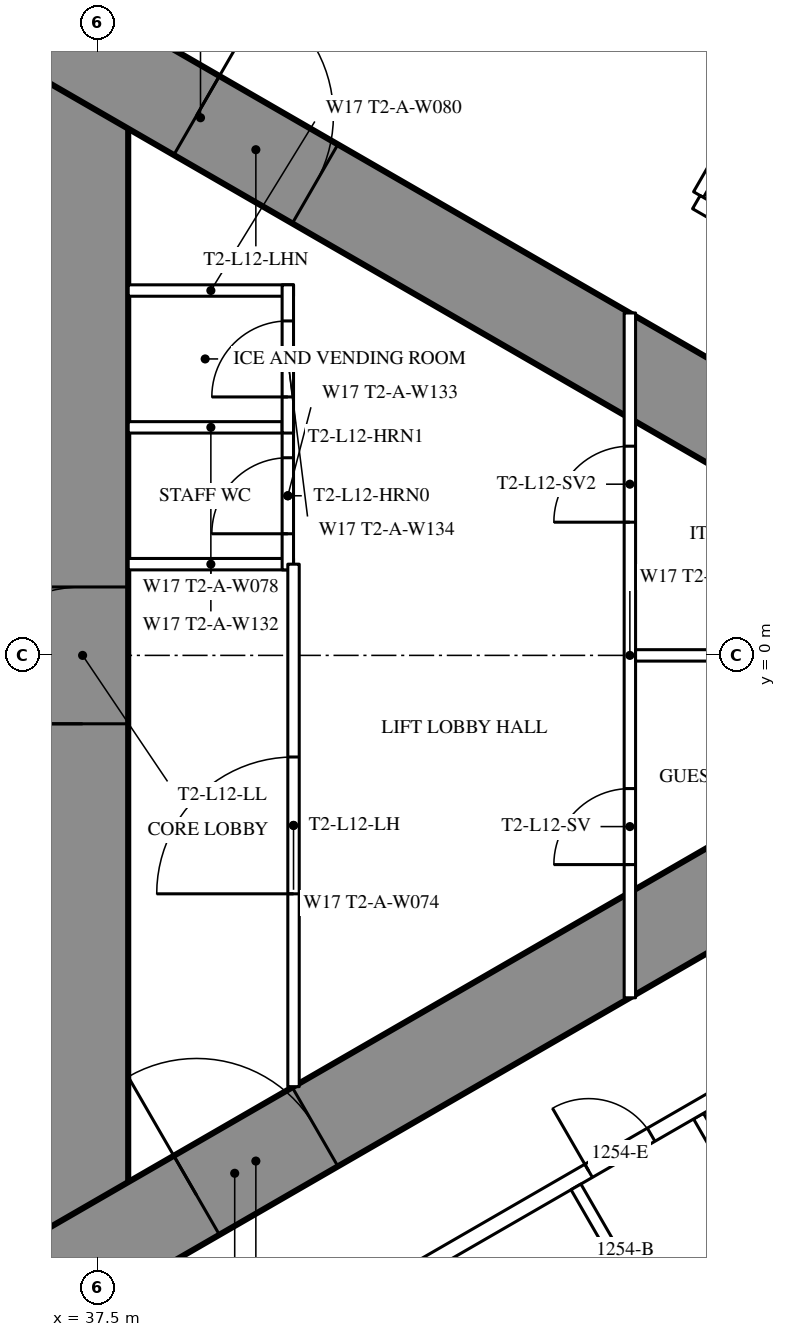
"""IFC4 building model, lengths in metres.
Left out: names, types, materials, properties, quantities, classifications, styles, units other than length and angle.
Written with IfcOpenShell. Run it as: python <this file> out.ifc"""

import sys

from ifc_helpers import new_model, si_unit, direction, frame, frame_2d, origin, place, context, subcontext, project, spatial, rectangle, extrude, element, fill, save


model = new_model("IFC4")
c1 = context("Model", 3, precision=1e-05, world=origin(), true_north=direction((0.0, 1.0)))
c2 = subcontext(c1, "Body", "Model", "MODEL_VIEW")
j1 = project(units=[si_unit("LENGTHUNIT", "METRE"), si_unit("PLANEANGLEUNIT", "RADIAN")], contexts=[c1])
p1 = place(None, origin())
s1 = spatial("IfcSite", under=j1, at=p1, CompositionType="ELEMENT")
p2 = place(p1, origin())
s2 = spatial("IfcBuilding", under=s1, at=p2, CompositionType="ELEMENT")
p3 = place(p2, frame((0.0, 0.0, 49.5)))
s3 = spatial("IfcBuildingStorey", under=s2, at=p3, CompositionType="ELEMENT", Elevation=49.5)
p4 = place(p3, frame((37.3, -8.6, 0.0), z_axis=(0.0, 0.0, 1.0), x_axis=(0.0, 1.0, 0.0)))
e1 = element("IfcWall", 1, at=p4, inside=s3, PredefinedType="SHEAR", context=c2, shape_type="SweptSolid", body=[
    extrude(rectangle(XDim=17.2, YDim=1.2, at=frame_2d((8.6, 0.0))), origin(), (0.0, 0.0, 1.0), 3.5),
])
p5 = place(p4, frame((7.7, 0.0, 0.0)))
e2 = element("IfcOpeningElement", 2, at=p5, cuts=e1, PredefinedType="OPENING", context=c2, shape_type="SweptSolid", body=[
    extrude(rectangle(XDim=1.8, YDim=2.2, at=frame_2d((0.9, 1.1))), frame((0.0, 0.61, 0.0), z_axis=(0.0, -1.0, 0.0), x_axis=(1.0, 0.0, 0.0)), (0.0, 0.0, 1.0), 1.22),
])
p6 = place(p3, frame((27.2, -13.8, 0.0), z_axis=(0.0, 0.0, 1.0), x_axis=(0.866027159892, 0.499996958321, 0.0)))
e3 = element("IfcWall", 3, at=p6, inside=s3, PredefinedType="SHEAR", context=c2, shape_type="SweptSolid", body=[
    extrude(rectangle(XDim=27.947, YDim=1.2, at=frame_2d((13.973, 0.0))), origin(), (0.0, 0.0, 1.0), 3.5),
])
p7 = place(p6, frame((4.6, 0.0, 0.0)))
e4 = element("IfcOpeningElement", 4, at=p7, cuts=e3, PredefinedType="OPENING", context=c2, shape_type="SweptSolid", body=[
    extrude(rectangle(XDim=1.0, YDim=2.2, at=frame_2d((0.5, 1.1))), frame((0.0, 0.61, 0.0), z_axis=(0.0, -1.0, 0.0), x_axis=(1.0, 0.0, 0.0)), (0.0, 0.0, 1.0), 1.22),
])
p8 = place(p6, frame((13.395, 0.0, 0.0)))
e5 = element("IfcOpeningElement", 5, at=p8, cuts=e3, PredefinedType="OPENING", context=c2, shape_type="SweptSolid", body=[
    extrude(rectangle(XDim=1.8, YDim=2.2, at=frame_2d((0.9, 1.1))), frame((0.0, 0.61, 0.0), z_axis=(0.0, -1.0, 0.0), x_axis=(1.0, 0.0, 0.0)), (0.0, 0.0, 1.0), 1.22),
])
p9 = place(p3, frame((27.2, 13.8, 0.0), z_axis=(0.0, 0.0, 1.0), x_axis=(0.866024515034, -0.500001539357, 0.0)))
e6 = element("IfcWall", 6, at=p9, inside=s3, PredefinedType="SHEAR", context=c2, shape_type="SweptSolid", body=[
    extrude(rectangle(XDim=26.907, YDim=1.2, at=frame_2d((13.454, 0.0))), origin(), (0.0, 0.0, 1.0), 3.5),
])
p10 = place(p9, frame((4.6, 0.0, 0.0)))
e7 = element("IfcOpeningElement", 7, at=p10, cuts=e6, PredefinedType="OPENING", context=c2, shape_type="SweptSolid", body=[
    extrude(rectangle(XDim=1.0, YDim=2.2, at=frame_2d((0.5, 1.1))), frame((0.0, 0.61, 0.0), z_axis=(0.0, -1.0, 0.0), x_axis=(1.0, 0.0, 0.0)), (0.0, 0.0, 1.0), 1.22),
])
p11 = place(p9, frame((13.395, 0.0, 0.0)))
e8 = element("IfcOpeningElement", 8, at=p11, cuts=e6, PredefinedType="OPENING", context=c2, shape_type="SweptSolid", body=[
    extrude(rectangle(XDim=1.8, YDim=2.2, at=frame_2d((0.9, 1.1))), frame((0.0, 0.61, 0.0), z_axis=(0.0, -1.0, 0.0), x_axis=(1.0, 0.0, 0.0)), (0.0, 0.0, 1.0), 1.22),
])
p12 = place(p3, frame((45.403, -6.062, 0.0), z_axis=(0.0, 0.0, 1.0), x_axis=(0.500007077968, -0.866021317279, 0.0)))
e9 = element("IfcWall", 9, at=p12, inside=s3, PredefinedType="PARTITIONING", context=c2, shape_type="SweptSolid", body=[
    extrude(rectangle(XDim=12.721, YDim=0.15, at=frame_2d((6.361, 0.0))), origin(), (0.0, 0.0, 1.0), 3.25),
])
p13 = place(p3, frame((45.403, 6.062, 0.0), z_axis=(0.0, 0.0, 1.0), x_axis=(0.500013434677, 0.866017647131, 0.0)))
e10 = element("IfcWall", 10, at=p13, inside=s3, PredefinedType="PARTITIONING", context=c2, shape_type="SweptSolid", body=[
    extrude(rectangle(XDim=9.902, YDim=0.15, at=frame_2d((4.951, 0.0))), origin(), (0.0, 0.0, 1.0), 2.25),
])
p14 = place(p3, frame((37.96, -10.243, 0.0), z_axis=(0.0, 0.0, 1.0), x_axis=(0.866026429433, 0.499998223521, 0.0)))
e11 = element("IfcWall", 11, at=p14, inside=s3, PredefinedType="PARTITIONING", context=c2, shape_type="SweptSolid", body=[
    extrude(rectangle(XDim=20.487, YDim=0.2, at=frame_2d((10.243, 0.0))), origin(), (0.0, 0.0, 1.0), 3.25),
])
p15 = place(p14, frame((6.925, 0.0, 0.0)))
e12 = element("IfcOpeningElement", 12, at=p15, cuts=e11, PredefinedType="OPENING", context=c2, shape_type="SweptSolid", body=[
    extrude(rectangle(XDim=0.95, YDim=2.2, at=frame_2d((0.475, 1.1))), frame((0.0, 0.11, 0.0), z_axis=(0.0, -1.0, 0.0), x_axis=(1.0, 0.0, 0.0)), (0.0, 0.0, 1.0), 0.22),
])
p16 = place(p14, frame((11.549, 0.0, 0.0)))
e13 = element("IfcOpeningElement", 13, at=p16, cuts=e11, PredefinedType="OPENING", context=c2, shape_type="SweptSolid", body=[
    extrude(rectangle(XDim=0.95, YDim=2.2, at=frame_2d((0.475, 1.1))), frame((0.0, 0.11, 0.0), z_axis=(0.0, -1.0, 0.0), x_axis=(1.0, 0.0, 0.0)), (0.0, 0.0, 1.0), 0.22),
])
p17 = place(p14, frame((13.249, 0.0, 0.0)))
e14 = element("IfcOpeningElement", 14, at=p17, cuts=e11, PredefinedType="OPENING", context=c2, shape_type="SweptSolid", body=[
    extrude(rectangle(XDim=0.95, YDim=2.2, at=frame_2d((0.475, 1.1))), frame((0.0, 0.11, 0.0), z_axis=(0.0, -1.0, 0.0), x_axis=(1.0, 0.0, 0.0)), (0.0, 0.0, 1.0), 0.22),
])
p18 = place(p14, frame((17.585, 0.0, 0.0)))
e15 = element("IfcOpeningElement", 15, at=p18, cuts=e11, PredefinedType="OPENING", context=c2, shape_type="SweptSolid", body=[
    extrude(rectangle(XDim=0.95, YDim=2.2, at=frame_2d((0.475, 1.1))), frame((0.0, 0.11, 0.0), z_axis=(0.0, -1.0, 0.0), x_axis=(1.0, 0.0, 0.0)), (0.0, 0.0, 1.0), 0.22),
])
p19 = place(p14, frame((0.6, 0.0, 0.0)))
e16 = element("IfcOpeningElement", 16, at=p19, cuts=e11, PredefinedType="OPENING", context=c2, shape_type="SweptSolid", body=[
    extrude(rectangle(XDim=0.95, YDim=2.2, at=frame_2d((0.475, 1.1))), frame((0.0, 0.11, 0.0), z_axis=(0.0, -1.0, 0.0), x_axis=(1.0, 0.0, 0.0)), (0.0, 0.0, 1.0), 0.22),
])
p20 = place(p3, frame((45.375, 5.963, 0.0), z_axis=(0.0, 0.0, 1.0), x_axis=(0.86603164725, -0.499989185844, 0.0)))
e17 = element("IfcWall", 17, at=p20, inside=s3, PredefinedType="PARTITIONING", context=c2, shape_type="SweptSolid", body=[
    extrude(rectangle(XDim=11.805, YDim=0.2, at=frame_2d((5.903, 0.0))), origin(), (0.0, 0.0, 1.0), 3.25),
])
p21 = place(p20, frame((9.024, 0.0, 0.0)))
e18 = element("IfcOpeningElement", 18, at=p21, cuts=e17, PredefinedType="OPENING", context=c2, shape_type="SweptSolid", body=[
    extrude(rectangle(XDim=0.95, YDim=2.2, at=frame_2d((0.475, 1.1))), frame((0.0, 0.11, 0.0), z_axis=(0.0, -1.0, 0.0), x_axis=(1.0, 0.0, 0.0)), (0.0, 0.0, 1.0), 0.22),
])
p22 = place(p20, frame((7.324, 0.0, 0.0)))
e19 = element("IfcOpeningElement", 19, at=p22, cuts=e17, PredefinedType="OPENING", context=c2, shape_type="SweptSolid", body=[
    extrude(rectangle(XDim=0.95, YDim=2.2, at=frame_2d((0.475, 1.1))), frame((0.0, 0.11, 0.0), z_axis=(0.0, -1.0, 0.0), x_axis=(1.0, 0.0, 0.0)), (0.0, 0.0, 1.0), 0.22),
])
p23 = place(p3, frame((43.791, -6.993, 0.0), z_axis=(0.0, 0.0, 1.0), x_axis=(0.500047596559, -0.865997922154, 0.0)))
e20 = element("IfcWall", 20, at=p23, inside=s3, PredefinedType="PARTITIONING", context=c2, shape_type="SweptSolid", body=[
    extrude(rectangle(XDim=2.6, YDim=0.15, at=frame_2d((1.3, 0.0))), origin(), (0.0, 0.0, 1.0), 3.25),
])
p24 = place(p23, frame((0.9, 0.0, 0.0)))
e21 = element("IfcOpeningElement", 21, at=p24, cuts=e20, PredefinedType="OPENING", context=c2, shape_type="SweptSolid", body=[
    extrude(rectangle(XDim=0.8, YDim=2.2, at=frame_2d((0.4, 1.1))), frame((0.0, 0.085, 0.0), z_axis=(0.0, -1.0, 0.0), x_axis=(1.0, 0.0, 0.0)), (0.0, 0.0, 1.0), 0.17),
])
for number, where, z_axis, x_axis in (
    (22, (37.9, 1.2, 0.0), (0.0, 0.0, 1.0), (1.0, 0.0, 0.0)),
    (23, (37.9, 3.0, 0.0), (0.0, 0.0, 1.0), (1.0, 0.0, 0.0)),
    (24, (37.9, 4.8, 0.0), (0.0, 0.0, 1.0), (1.0, 0.0, 0.0)),
):
    element("IfcWall", number, at=place(p3, frame(where, z_axis=z_axis, x_axis=x_axis)), inside=s3, PredefinedType="PARTITIONING", context=c2, shape_type="SweptSolid", body=[
        extrude(rectangle(XDim=2.175, YDim=0.15, at=frame_2d((1.087, 0.0))), origin(), (0.0, 0.0, 1.0), 3.25),
    ])
p25 = place(p3, frame((40.0, 1.125, 0.0), z_axis=(0.0, 0.0, 1.0), x_axis=(0.0, 1.0, 0.0)))
e25 = element("IfcWall", 25, at=p25, inside=s3, PredefinedType="PARTITIONING", context=c2, shape_type="SweptSolid", body=[
    extrude(rectangle(XDim=1.95, YDim=0.15, at=frame_2d((0.975, 0.0))), origin(), (0.0, 0.0, 1.0), 3.25),
])
p26 = place(p25, frame((0.475, 0.0, 0.0)))
e26 = element("IfcOpeningElement", 26, at=p26, cuts=e25, PredefinedType="OPENING", context=c2, shape_type="SweptSolid", body=[
    extrude(rectangle(XDim=1.0, YDim=2.2, at=frame_2d((0.5, 1.1))), frame((0.0, 0.085, 0.0), z_axis=(0.0, -1.0, 0.0), x_axis=(1.0, 0.0, 0.0)), (0.0, 0.0, 1.0), 0.17),
])
p27 = place(p3, frame((40.0, 2.925, 0.0), z_axis=(0.0, 0.0, 1.0), x_axis=(0.0, 1.0, 0.0)))
e27 = element("IfcWall", 27, at=p27, inside=s3, PredefinedType="PARTITIONING", context=c2, shape_type="SweptSolid", body=[
    extrude(rectangle(XDim=1.95, YDim=0.15, at=frame_2d((0.975, 0.0))), origin(), (0.0, 0.0, 1.0), 3.25),
])
p28 = place(p27, frame((0.475, 0.0, 0.0)))
e28 = element("IfcOpeningElement", 28, at=p28, cuts=e27, PredefinedType="OPENING", context=c2, shape_type="SweptSolid", body=[
    extrude(rectangle(XDim=1.0, YDim=2.2, at=frame_2d((0.5, 1.1))), frame((0.0, 0.085, 0.0), z_axis=(0.0, -1.0, 0.0), x_axis=(1.0, 0.0, 0.0)), (0.0, 0.0, 1.0), 0.17),
])
p29 = place(p3, frame((40.075, -5.674, 0.0), z_axis=(0.0, 0.0, 1.0), x_axis=(0.0, 1.0, 0.0)))
e29 = element("IfcWall", 29, at=p29, inside=s3, PredefinedType="PARTITIONING", context=c2, shape_type="SweptSolid", body=[
    extrude(rectangle(XDim=6.874, YDim=0.15, at=frame_2d((3.437, 0.0))), origin(), (0.0, 0.0, 1.0), 3.25),
])
p30 = place(p29, frame((2.537, 0.0, 0.0)))
e30 = element("IfcOpeningElement", 30, at=p30, cuts=e29, PredefinedType="OPENING", context=c2, shape_type="SweptSolid", body=[
    extrude(rectangle(XDim=1.8, YDim=2.2, at=frame_2d((0.9, 1.1))), frame((0.0, 0.085, 0.0), z_axis=(0.0, -1.0, 0.0), x_axis=(1.0, 0.0, 0.0)), (0.0, 0.0, 1.0), 0.17),
])
p31 = place(p3, frame((44.5, -4.505, 0.0), z_axis=(0.0, 0.0, 1.0), x_axis=(0.0, 1.0, 0.0)))
e31 = element("IfcWall", 31, at=p31, inside=s3, PredefinedType="PARTITIONING", context=c2, shape_type="SweptSolid", body=[
    extrude(rectangle(XDim=9.009, YDim=0.15, at=frame_2d((4.505, 0.0))), origin(), (0.0, 0.0, 1.0), 2.45),
])
p32 = place(p31, frame((1.752, 0.0, 0.0)))
e32 = element("IfcOpeningElement", 32, at=p32, cuts=e31, PredefinedType="OPENING", context=c2, shape_type="SweptSolid", body=[
    extrude(rectangle(XDim=1.0, YDim=2.2, at=frame_2d((0.5, 1.1))), frame((0.0, 0.085, 0.0), z_axis=(0.0, -1.0, 0.0), x_axis=(1.0, 0.0, 0.0)), (0.0, 0.0, 1.0), 0.17),
])
p33 = place(p31, frame((6.257, 0.0, 0.0)))
e33 = element("IfcOpeningElement", 33, at=p33, cuts=e31, PredefinedType="OPENING", context=c2, shape_type="SweptSolid", body=[
    extrude(rectangle(XDim=1.0, YDim=2.2, at=frame_2d((0.5, 1.1))), frame((0.0, 0.085, 0.0), z_axis=(0.0, -1.0, 0.0), x_axis=(1.0, 0.0, 0.0)), (0.0, 0.0, 1.0), 0.17),
])
p34 = place(p3, frame((44.575, 0.0, 0.0), z_axis=(0.0, 0.0, 1.0), x_axis=(1.0, 0.0, 0.0)))
e34 = element("IfcWall", 34, at=p34, inside=s3, PredefinedType="PARTITIONING", context=c2, shape_type="SweptSolid", body=[
    extrude(rectangle(XDim=7.727, YDim=0.15, at=frame_2d((3.864, 0.0))), origin(), (0.0, 0.0, 1.0), 2.25),
])
p35 = place(p24, origin())
e35 = element("IfcDoor", 35, at=p35, inside=s3, OperationType="SINGLE_SWING_RIGHT", PredefinedType="DOOR", context=c2, shape_type="SweptSolid", body=[
    extrude(rectangle(XDim=0.8, YDim=2.2, at=frame_2d((0.4, 1.1))), frame((0.0, 0.025, 0.0), z_axis=(0.0, -1.0, 0.0), x_axis=(1.0, 0.0, 0.0)), (0.0, 0.0, 1.0), 0.05),
])
fill(e21, e35)
p36 = place(p15, origin())
e36 = element("IfcDoor", 36, at=p36, inside=s3, OperationType="SINGLE_SWING_LEFT", PredefinedType="DOOR", context=c2, shape_type="SweptSolid", body=[
    extrude(rectangle(XDim=0.95, YDim=2.2, at=frame_2d((0.475, 1.1))), frame((0.0, 0.025, 0.0), z_axis=(0.0, -1.0, 0.0), x_axis=(1.0, 0.0, 0.0)), (0.0, 0.0, 1.0), 0.05),
])
fill(e12, e36)
p37 = place(p26, origin())
e37 = element("IfcDoor", 37, at=p37, inside=s3, OperationType="SINGLE_SWING_LEFT", PredefinedType="DOOR", context=c2, shape_type="SweptSolid", body=[
    extrude(rectangle(XDim=1.0, YDim=2.2, at=frame_2d((0.5, 1.1))), frame((0.0, 0.025, 0.0), z_axis=(0.0, -1.0, 0.0), x_axis=(1.0, 0.0, 0.0)), (0.0, 0.0, 1.0), 0.05),
])
fill(e26, e37)
p38 = place(p28, origin())
e38 = element("IfcDoor", 38, at=p38, inside=s3, OperationType="SINGLE_SWING_LEFT", PredefinedType="DOOR", context=c2, shape_type="SweptSolid", body=[
    extrude(rectangle(XDim=1.0, YDim=2.2, at=frame_2d((0.5, 1.1))), frame((0.0, 0.025, 0.0), z_axis=(0.0, -1.0, 0.0), x_axis=(1.0, 0.0, 0.0)), (0.0, 0.0, 1.0), 0.05),
])
fill(e28, e38)
p39 = place(p30, origin())
e39 = element("IfcDoor", 39, at=p39, inside=s3, OperationType="DOUBLE_DOOR_SINGLE_SWING", PredefinedType="DOOR", context=c2, shape_type="SweptSolid", body=[
    extrude(rectangle(XDim=1.8, YDim=2.2, at=frame_2d((0.9, 1.1))), frame((0.0, 0.025, 0.0), z_axis=(0.0, -1.0, 0.0), x_axis=(1.0, 0.0, 0.0)), (0.0, 0.0, 1.0), 0.05),
])
fill(e30, e39)
p40 = place(p32, origin())
e40 = element("IfcDoor", 40, at=p40, inside=s3, OperationType="SINGLE_SWING_LEFT", PredefinedType="DOOR", context=c2, shape_type="SweptSolid", body=[
    extrude(rectangle(XDim=1.0, YDim=2.2, at=frame_2d((0.5, 1.1))), frame((0.0, 0.025, 0.0), z_axis=(0.0, -1.0, 0.0), x_axis=(1.0, 0.0, 0.0)), (0.0, 0.0, 1.0), 0.05),
])
fill(e32, e40)
p41 = place(p33, origin())
e41 = element("IfcDoor", 41, at=p41, inside=s3, OperationType="SINGLE_SWING_LEFT", PredefinedType="DOOR", context=c2, shape_type="SweptSolid", body=[
    extrude(rectangle(XDim=1.0, YDim=2.2, at=frame_2d((0.5, 1.1))), frame((0.0, 0.025, 0.0), z_axis=(0.0, -1.0, 0.0), x_axis=(1.0, 0.0, 0.0)), (0.0, 0.0, 1.0), 0.05),
])
fill(e33, e41)
p42 = place(p8, origin())
e42 = element("IfcDoor", 42, at=p42, inside=s3, OperationType="DOUBLE_DOOR_SINGLE_SWING", PredefinedType="DOOR", context=c2, shape_type="SweptSolid", body=[
    extrude(rectangle(XDim=1.8, YDim=2.2, at=frame_2d((0.9, 1.1))), frame((0.0, 0.025, 0.0), z_axis=(0.0, -1.0, 0.0), x_axis=(1.0, 0.0, 0.0)), (0.0, 0.0, 1.0), 0.05),
])
fill(e5, e42)
p43 = place(p11, origin())
e43 = element("IfcDoor", 43, at=p43, inside=s3, OperationType="DOUBLE_DOOR_SINGLE_SWING", PredefinedType="DOOR", context=c2, shape_type="SweptSolid", body=[
    extrude(rectangle(XDim=1.8, YDim=2.2, at=frame_2d((0.9, 1.1))), frame((0.0, 0.025, 0.0), z_axis=(0.0, -1.0, 0.0), x_axis=(1.0, 0.0, 0.0)), (0.0, 0.0, 1.0), 0.05),
])
fill(e8, e43)
p44 = place(p5, origin())
e44 = element("IfcDoor", 44, at=p44, inside=s3, OperationType="DOUBLE_DOOR_SINGLE_SWING", PredefinedType="DOOR", context=c2, shape_type="SweptSolid", body=[
    extrude(rectangle(XDim=1.8, YDim=2.2, at=frame_2d((0.9, 1.1))), frame((0.0, 0.025, 0.0), z_axis=(0.0, -1.0, 0.0), x_axis=(1.0, 0.0, 0.0)), (0.0, 0.0, 1.0), 0.05),
])
fill(e2, e44)
save(model, sys.argv[1])
